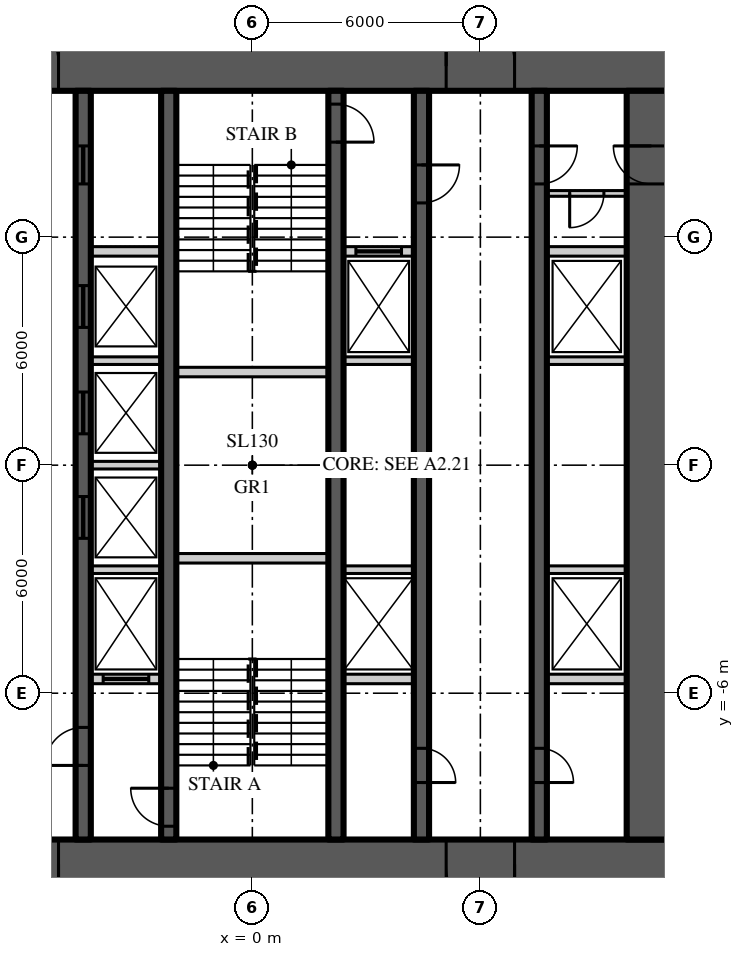
"""IFC4 building model, lengths in metres.
Left out: names, types, materials, properties, quantities, classifications, styles, units other than length and angle.
Written with IfcOpenShell. Run it as: python <this file> out.ifc"""

import sys

from ifc_helpers import new_model, si_unit, direction, frame, frame_2d, origin, place, context, subcontext, project, spatial, rectangle, extrude, element, fill, save


model = new_model("IFC4")
c1 = context("Model", 3, precision=1e-05, world=origin(), true_north=direction((0.0, 1.0)))
c2 = subcontext(c1, "Body", "Model", "MODEL_VIEW")
j1 = project(units=[si_unit("LENGTHUNIT", "METRE"), si_unit("PLANEANGLEUNIT", "RADIAN")], contexts=[c1])
p1 = place(None, origin())
s1 = spatial("IfcSite", under=j1, at=p1, CompositionType="ELEMENT")
p2 = place(p1, origin())
s2 = spatial("IfcBuilding", under=s1, at=p2, CompositionType="ELEMENT")
p3 = place(p2, frame((0.0, 0.0, 147.6)))
s3 = spatial("IfcBuildingStorey", under=s2, at=p3, CompositionType="ELEMENT", Elevation=147.6)
p4 = place(p3, frame((-11.15, 10.5, 0.0), z_axis=(0.0, 0.0, 1.0), x_axis=(1.0, 0.0, 0.0)))
e1 = element("IfcWall", 1, at=p4, inside=s3, PredefinedType="SHEAR", context=c2, shape_type="SweptSolid", body=[
    extrude(rectangle(XDim=22.3, YDim=1.3, at=frame_2d((11.15, 0.0))), origin(), (0.0, 0.0, 1.0), 3.9),
])
p5 = place(p4, frame((4.25, 0.0, 0.0)))
e2 = element("IfcOpeningElement", 2, at=p5, cuts=e1, PredefinedType="OPENING", context=c2, shape_type="SweptSolid", body=[
    extrude(rectangle(XDim=1.8, YDim=2.2, at=frame_2d((0.9, 1.1))), frame((0.0, 0.66, 0.0), z_axis=(0.0, -1.0, 0.0), x_axis=(1.0, 0.0, 0.0)), (0.0, 0.0, 1.0), 1.32),
])
p6 = place(p4, frame((16.25, 0.0, 0.0)))
e3 = element("IfcOpeningElement", 3, at=p6, cuts=e1, PredefinedType="OPENING", context=c2, shape_type="SweptSolid", body=[
    extrude(rectangle(XDim=1.8, YDim=2.2, at=frame_2d((0.9, 1.1))), frame((0.0, 0.66, 0.0), z_axis=(0.0, -1.0, 0.0), x_axis=(1.0, 0.0, 0.0)), (0.0, 0.0, 1.0), 1.32),
])
p7 = place(p3, frame((11.15, -10.5, 0.0), z_axis=(0.0, 0.0, 1.0), x_axis=(-1.0, 0.0, 0.0)))
e4 = element("IfcWall", 4, at=p7, inside=s3, PredefinedType="SHEAR", context=c2, shape_type="SweptSolid", body=[
    extrude(rectangle(XDim=22.3, YDim=1.3, at=frame_2d((11.15, 0.0))), origin(), (0.0, 0.0, 1.0), 3.9),
])
p8 = place(p7, frame((16.25, 0.0, 0.0)))
e5 = element("IfcOpeningElement", 5, at=p8, cuts=e4, PredefinedType="OPENING", context=c2, shape_type="SweptSolid", body=[
    extrude(rectangle(XDim=1.8, YDim=2.2, at=frame_2d((0.9, 1.1))), frame((0.0, 0.66, 0.0), z_axis=(0.0, -1.0, 0.0), x_axis=(1.0, 0.0, 0.0)), (0.0, 0.0, 1.0), 1.32),
])
p9 = place(p7, frame((4.25, 0.0, 0.0)))
e6 = element("IfcOpeningElement", 6, at=p9, cuts=e4, PredefinedType="OPENING", context=c2, shape_type="SweptSolid", body=[
    extrude(rectangle(XDim=1.8, YDim=2.2, at=frame_2d((0.9, 1.1))), frame((0.0, 0.66, 0.0), z_axis=(0.0, -1.0, 0.0), x_axis=(1.0, 0.0, 0.0)), (0.0, 0.0, 1.0), 1.32),
])
p10 = place(p3, frame((10.5, -9.85, 0.0), z_axis=(0.0, 0.0, 1.0), x_axis=(0.0, 1.0, 0.0)))
e7 = element("IfcWall", 7, at=p10, inside=s3, PredefinedType="SHEAR", context=c2, shape_type="SweptSolid", body=[
    extrude(rectangle(XDim=19.7, YDim=1.3, at=frame_2d((9.85, 0.0))), origin(), (0.0, 0.0, 1.0), 3.9),
])
p11 = place(p10, frame((17.25, 0.0, 0.0)))
e8 = element("IfcOpeningElement", 8, at=p11, cuts=e7, PredefinedType="OPENING", context=c2, shape_type="SweptSolid", body=[
    extrude(rectangle(XDim=1.0, YDim=2.2, at=frame_2d((0.5, 1.1))), frame((0.0, 0.66, 0.0), z_axis=(0.0, -1.0, 0.0), x_axis=(1.0, 0.0, 0.0)), (0.0, 0.0, 1.0), 1.32),
])
p12 = place(p3, frame((7.55, 9.85, 0.0), z_axis=(0.0, 0.0, 1.0), x_axis=(0.0, -1.0, 0.0)))
e9 = element("IfcWall", 9, at=p12, inside=s3, PredefinedType="SHEAR", context=c2, shape_type="SweptSolid", body=[
    extrude(rectangle(XDim=19.7, YDim=0.4, at=frame_2d((9.85, 0.0))), origin(), (0.0, 0.0, 1.0), 3.9),
])
p13 = place(p12, frame((1.45, 0.0, 0.0)))
e10 = element("IfcOpeningElement", 10, at=p13, cuts=e9, PredefinedType="OPENING", context=c2, shape_type="SweptSolid", body=[
    extrude(rectangle(XDim=1.0, YDim=2.2, at=frame_2d((0.5, 1.1))), frame((0.0, 0.21, 0.0), z_axis=(0.0, -1.0, 0.0), x_axis=(1.0, 0.0, 0.0)), (0.0, 0.0, 1.0), 0.42),
])
p14 = place(p12, frame((17.3, 0.0, 0.0)))
e11 = element("IfcOpeningElement", 11, at=p14, cuts=e9, PredefinedType="OPENING", context=c2, shape_type="SweptSolid", body=[
    extrude(rectangle(XDim=0.9, YDim=2.1, at=frame_2d((0.45, 1.05))), frame((0.0, 0.21, 0.0), z_axis=(0.0, -1.0, 0.0), x_axis=(1.0, 0.0, 0.0)), (0.0, 0.0, 1.0), 0.42),
])
p15 = place(p3, frame((-4.45, -9.85, 0.0), z_axis=(0.0, 0.0, 1.0), x_axis=(0.0, 1.0, 0.0)))
e12 = element("IfcWall", 12, at=p15, inside=s3, PredefinedType="SHEAR", context=c2, shape_type="SweptSolid", body=[
    extrude(rectangle(XDim=19.7, YDim=0.4, at=frame_2d((9.85, 0.0))), origin(), (0.0, 0.0, 1.0), 3.9),
])
p16 = place(p15, frame((1.95, 0.0, 0.0)))
e13 = element("IfcOpeningElement", 13, at=p16, cuts=e12, PredefinedType="OPENING", context=c2, shape_type="SweptSolid", body=[
    extrude(rectangle(XDim=1.0, YDim=2.2, at=frame_2d((0.5, 1.1))), frame((0.0, 0.21, 0.0), z_axis=(0.0, -1.0, 0.0), x_axis=(1.0, 0.0, 0.0)), (0.0, 0.0, 1.0), 0.42),
])
p17 = place(p15, frame((17.25, 0.0, 0.0)))
e14 = element("IfcOpeningElement", 14, at=p17, cuts=e12, PredefinedType="OPENING", context=c2, shape_type="SweptSolid", body=[
    extrude(rectangle(XDim=1.0, YDim=2.1, at=frame_2d((0.5, 1.05))), frame((0.0, 0.21, 0.0), z_axis=(0.0, -1.0, 0.0), x_axis=(1.0, 0.0, 0.0)), (0.0, 0.0, 1.0), 0.42),
])
p18 = place(p15, frame((7.925, 0.0, 0.0)))
e15 = element("IfcOpeningElement", 15, at=p18, cuts=e12, PredefinedType="OPENING", context=c2, shape_type="SweptSolid", body=[
    extrude(rectangle(XDim=1.1, YDim=2.2, at=frame_2d((0.55, 1.1))), frame((0.0, 0.21, 0.0), z_axis=(0.0, -1.0, 0.0), x_axis=(1.0, 0.0, 0.0)), (0.0, 0.0, 1.0), 0.42),
])
p19 = place(p15, frame((10.675, 0.0, 0.0)))
e16 = element("IfcOpeningElement", 16, at=p19, cuts=e12, PredefinedType="OPENING", context=c2, shape_type="SweptSolid", body=[
    extrude(rectangle(XDim=1.1, YDim=2.2, at=frame_2d((0.55, 1.1))), frame((0.0, 0.21, 0.0), z_axis=(0.0, -1.0, 0.0), x_axis=(1.0, 0.0, 0.0)), (0.0, 0.0, 1.0), 0.42),
])
p20 = place(p15, frame((13.475, 0.0, 0.0)))
e17 = element("IfcOpeningElement", 17, at=p20, cuts=e12, PredefinedType="OPENING", context=c2, shape_type="SweptSolid", body=[
    extrude(rectangle(XDim=1.1, YDim=2.2, at=frame_2d((0.55, 1.1))), frame((0.0, 0.21, 0.0), z_axis=(0.0, -1.0, 0.0), x_axis=(1.0, 0.0, 0.0)), (0.0, 0.0, 1.0), 0.42),
])
p21 = place(p3, frame((4.45, 9.85, 0.0), z_axis=(0.0, 0.0, 1.0), x_axis=(0.0, -1.0, 0.0)))
e18 = element("IfcWall", 18, at=p21, inside=s3, PredefinedType="SHEAR", context=c2, shape_type="SweptSolid", body=[
    extrude(rectangle(XDim=19.7, YDim=0.4, at=frame_2d((9.85, 0.0))), origin(), (0.0, 0.0, 1.0), 3.9),
])
p22 = place(p21, frame((1.95, 0.0, 0.0)))
e19 = element("IfcOpeningElement", 19, at=p22, cuts=e18, PredefinedType="OPENING", context=c2, shape_type="SweptSolid", body=[
    extrude(rectangle(XDim=1.0, YDim=2.2, at=frame_2d((0.5, 1.1))), frame((0.0, 0.21, 0.0), z_axis=(0.0, -1.0, 0.0), x_axis=(1.0, 0.0, 0.0)), (0.0, 0.0, 1.0), 0.42),
])
p23 = place(p21, frame((17.3, 0.0, 0.0)))
e20 = element("IfcOpeningElement", 20, at=p23, cuts=e18, PredefinedType="OPENING", context=c2, shape_type="SweptSolid", body=[
    extrude(rectangle(XDim=0.9, YDim=2.1, at=frame_2d((0.45, 1.05))), frame((0.0, 0.21, 0.0), z_axis=(0.0, -1.0, 0.0), x_axis=(1.0, 0.0, 0.0)), (0.0, 0.0, 1.0), 0.42),
])
p24 = place(p3, frame((-2.2, -9.85, 0.0), z_axis=(0.0, 0.0, 1.0), x_axis=(0.0, 1.0, 0.0)))
e21 = element("IfcWall", 21, at=p24, inside=s3, PredefinedType="SHEAR", context=c2, shape_type="SweptSolid", body=[
    extrude(rectangle(XDim=19.7, YDim=0.4, at=frame_2d((9.85, 0.0))), origin(), (0.0, 0.0, 1.0), 3.9),
])
p25 = place(p24, frame((0.35, 0.0, 0.0)))
e22 = element("IfcOpeningElement", 22, at=p25, cuts=e21, PredefinedType="OPENING", context=c2, shape_type="SweptSolid", body=[
    extrude(rectangle(XDim=1.0, YDim=2.2, at=frame_2d((0.5, 1.1))), frame((0.0, 0.21, 0.0), z_axis=(0.0, -1.0, 0.0), x_axis=(1.0, 0.0, 0.0)), (0.0, 0.0, 1.0), 0.42),
])
p26 = place(p3, frame((2.2, 9.85, 0.0), z_axis=(0.0, 0.0, 1.0), x_axis=(0.0, -1.0, 0.0)))
e23 = element("IfcWall", 23, at=p26, inside=s3, PredefinedType="SHEAR", context=c2, shape_type="SweptSolid", body=[
    extrude(rectangle(XDim=19.7, YDim=0.4, at=frame_2d((9.85, 0.0))), origin(), (0.0, 0.0, 1.0), 3.9),
])
p27 = place(p26, frame((0.35, 0.0, 0.0)))
e24 = element("IfcOpeningElement", 24, at=p27, cuts=e23, PredefinedType="OPENING", context=c2, shape_type="SweptSolid", body=[
    extrude(rectangle(XDim=1.0, YDim=2.2, at=frame_2d((0.5, 1.1))), frame((0.0, 0.21, 0.0), z_axis=(0.0, -1.0, 0.0), x_axis=(1.0, 0.0, 0.0)), (0.0, 0.0, 1.0), 0.42),
])
p28 = place(p3, frame((-4.25, 5.625, 0.0), z_axis=(0.0, 0.0, 1.0), x_axis=(1.0, 0.0, 0.0)))
e25 = element("IfcWall", 25, at=p28, inside=s3, PredefinedType="SOLIDWALL", context=c2, shape_type="SweptSolid", body=[
    extrude(rectangle(XDim=1.85, YDim=0.25, at=frame_2d((0.925, 0.0))), origin(), (0.0, 0.0, 1.0), 3.7),
])
p29 = place(p3, frame((2.4, 5.625, 0.0), z_axis=(0.0, 0.0, 1.0), x_axis=(1.0, 0.0, 0.0)))
e26 = element("IfcWall", 26, at=p29, inside=s3, PredefinedType="SOLIDWALL", context=c2, shape_type="SweptSolid", body=[
    extrude(rectangle(XDim=1.85, YDim=0.25, at=frame_2d((0.925, 0.0))), origin(), (0.0, 0.0, 1.0), 3.7),
])
p30 = place(p29, frame((0.325, 0.0, 0.0)))
e27 = element("IfcOpeningElement", 27, at=p30, cuts=e26, PredefinedType="OPENING", context=c2, shape_type="SweptSolid", body=[
    extrude(rectangle(XDim=1.2, YDim=2.2, at=frame_2d((0.6, 1.1))), frame((0.0, 0.135, 0.0), z_axis=(0.0, -1.0, 0.0), x_axis=(1.0, 0.0, 0.0)), (0.0, 0.0, 1.0), 0.27),
])
p31 = place(p3, frame((7.75, 5.625, 0.0), z_axis=(0.0, 0.0, 1.0), x_axis=(1.0, 0.0, 0.0)))
e28 = element("IfcWall", 28, at=p31, inside=s3, PredefinedType="SOLIDWALL", context=c2, shape_type="SweptSolid", body=[
    extrude(rectangle(XDim=2.1, YDim=0.25, at=frame_2d((1.05, 0.0))), origin(), (0.0, 0.0, 1.0), 3.7),
])
p32 = place(p3, frame((-4.25, -5.625, 0.0), z_axis=(0.0, 0.0, 1.0), x_axis=(1.0, 0.0, 0.0)))
e29 = element("IfcWall", 29, at=p32, inside=s3, PredefinedType="SOLIDWALL", context=c2, shape_type="SweptSolid", body=[
    extrude(rectangle(XDim=1.85, YDim=0.25, at=frame_2d((0.925, 0.0))), origin(), (0.0, 0.0, 1.0), 3.7),
])
p33 = place(p32, frame((0.325, 0.0, 0.0)))
e30 = element("IfcOpeningElement", 30, at=p33, cuts=e29, PredefinedType="OPENING", context=c2, shape_type="SweptSolid", body=[
    extrude(rectangle(XDim=1.2, YDim=2.2, at=frame_2d((0.6, 1.1))), frame((0.0, 0.135, 0.0), z_axis=(0.0, -1.0, 0.0), x_axis=(1.0, 0.0, 0.0)), (0.0, 0.0, 1.0), 0.27),
])
p34 = place(p3, frame((2.4, -5.625, 0.0), z_axis=(0.0, 0.0, 1.0), x_axis=(1.0, 0.0, 0.0)))
e31 = element("IfcWall", 31, at=p34, inside=s3, PredefinedType="SOLIDWALL", context=c2, shape_type="SweptSolid", body=[
    extrude(rectangle(XDim=1.85, YDim=0.25, at=frame_2d((0.925, 0.0))), origin(), (0.0, 0.0, 1.0), 3.7),
])
p35 = place(p3, frame((7.75, -5.625, 0.0), z_axis=(0.0, 0.0, 1.0), x_axis=(1.0, 0.0, 0.0)))
e32 = element("IfcWall", 32, at=p35, inside=s3, PredefinedType="SOLIDWALL", context=c2, shape_type="SweptSolid", body=[
    extrude(rectangle(XDim=2.1, YDim=0.25, at=frame_2d((1.05, 0.0))), origin(), (0.0, 0.0, 1.0), 3.7),
])
for number, where, z_axis, x_axis in (
    (33, (-2.0, -2.45, 0.0), (0.0, 0.0, 1.0), (1.0, 0.0, 0.0)),
    (34, (-2.0, 2.45, 0.0), (0.0, 0.0, 1.0), (1.0, 0.0, 0.0)),
):
    element("IfcWall", number, at=place(p3, frame(where, z_axis=z_axis, x_axis=x_axis)), inside=s3, PredefinedType="SOLIDWALL", context=c2, shape_type="SweptSolid", body=[
        extrude(rectangle(XDim=4.0, YDim=0.25, at=frame_2d((2.0, 0.0))), origin(), (0.0, 0.0, 1.0), 3.7),
    ])
for number, where, z_axis, x_axis in (
    (35, (-4.25, -2.75, 0.0), (0.0, 0.0, 1.0), (1.0, 0.0, 0.0)),
    (36, (2.4, -2.75, 0.0), (0.0, 0.0, 1.0), (1.0, 0.0, 0.0)),
):
    element("IfcWall", number, at=place(p3, frame(where, z_axis=z_axis, x_axis=x_axis)), inside=s3, PredefinedType="SOLIDWALL", context=c2, shape_type="SweptSolid", body=[
        extrude(rectangle(XDim=1.85, YDim=0.2, at=frame_2d((0.925, 0.0))), origin(), (0.0, 0.0, 1.0), 3.7),
    ])
p36 = place(p3, frame((7.75, -2.75, 0.0), z_axis=(0.0, 0.0, 1.0), x_axis=(1.0, 0.0, 0.0)))
e37 = element("IfcWall", 37, at=p36, inside=s3, PredefinedType="SOLIDWALL", context=c2, shape_type="SweptSolid", body=[
    extrude(rectangle(XDim=2.1, YDim=0.2, at=frame_2d((1.05, 0.0))), origin(), (0.0, 0.0, 1.0), 3.7),
])
for number, where, z_axis, x_axis in (
    (38, (-4.25, 0.0, 0.0), (0.0, 0.0, 1.0), (1.0, 0.0, 0.0)),
    (39, (-4.25, 2.75, 0.0), (0.0, 0.0, 1.0), (1.0, 0.0, 0.0)),
    (40, (2.4, 2.75, 0.0), (0.0, 0.0, 1.0), (1.0, 0.0, 0.0)),
):
    element("IfcWall", number, at=place(p3, frame(where, z_axis=z_axis, x_axis=x_axis)), inside=s3, PredefinedType="SOLIDWALL", context=c2, shape_type="SweptSolid", body=[
        extrude(rectangle(XDim=1.85, YDim=0.2, at=frame_2d((0.925, 0.0))), origin(), (0.0, 0.0, 1.0), 3.7),
    ])
p37 = place(p3, frame((7.75, 2.75, 0.0), z_axis=(0.0, 0.0, 1.0), x_axis=(1.0, 0.0, 0.0)))
e41 = element("IfcWall", 41, at=p37, inside=s3, PredefinedType="SOLIDWALL", context=c2, shape_type="SweptSolid", body=[
    extrude(rectangle(XDim=2.1, YDim=0.2, at=frame_2d((1.05, 0.0))), origin(), (0.0, 0.0, 1.0), 3.7),
])
p38 = place(p3, frame((9.85, 7.15, 0.0), z_axis=(0.0, 0.0, 1.0), x_axis=(-1.0, 0.0, 0.0)))
e42 = element("IfcWall", 42, at=p38, inside=s3, PredefinedType="SOLIDWALL", context=c2, shape_type="SweptSolid", body=[
    extrude(rectangle(XDim=2.1, YDim=0.15, at=frame_2d((1.05, 0.0))), origin(), (0.0, 0.0, 1.0), 3.77),
])
p39 = place(p38, frame((0.6, 0.0, 0.0)))
e43 = element("IfcOpeningElement", 43, at=p39, cuts=e42, PredefinedType="OPENING", context=c2, shape_type="SweptSolid", body=[
    extrude(rectangle(XDim=0.9, YDim=2.1, at=frame_2d((0.45, 1.05))), frame((0.0, 0.085, 0.0), z_axis=(0.0, -1.0, 0.0), x_axis=(1.0, 0.0, 0.0)), (0.0, 0.0, 1.0), 0.17),
])
p40 = place(p5, origin())
e44 = element("IfcDoor", 44, at=p40, inside=s3, OperationType="DOUBLE_DOOR_DOUBLE_SWING", PredefinedType="DOOR", context=c2, shape_type="SweptSolid", body=[
    extrude(rectangle(XDim=1.8, YDim=2.2, at=frame_2d((0.9, 1.1))), frame((0.0, 0.025, 0.0), z_axis=(0.0, -1.0, 0.0), x_axis=(1.0, 0.0, 0.0)), (0.0, 0.0, 1.0), 0.05),
])
fill(e2, e44)
p41 = place(p8, origin())
e45 = element("IfcDoor", 45, at=p41, inside=s3, OperationType="DOUBLE_DOOR_DOUBLE_SWING", PredefinedType="DOOR", context=c2, shape_type="SweptSolid", body=[
    extrude(rectangle(XDim=1.8, YDim=2.2, at=frame_2d((0.9, 1.1))), frame((0.0, 0.025, 0.0), z_axis=(0.0, -1.0, 0.0), x_axis=(1.0, 0.0, 0.0)), (0.0, 0.0, 1.0), 0.05),
])
fill(e5, e45)
p42 = place(p6, origin())
e46 = element("IfcDoor", 46, at=p42, inside=s3, OperationType="DOUBLE_DOOR_DOUBLE_SWING", PredefinedType="DOOR", context=c2, shape_type="SweptSolid", body=[
    extrude(rectangle(XDim=1.8, YDim=2.2, at=frame_2d((0.9, 1.1))), frame((0.0, 0.025, 0.0), z_axis=(0.0, -1.0, 0.0), x_axis=(1.0, 0.0, 0.0)), (0.0, 0.0, 1.0), 0.05),
])
fill(e3, e46)
p43 = place(p9, origin())
e47 = element("IfcDoor", 47, at=p43, inside=s3, OperationType="DOUBLE_DOOR_DOUBLE_SWING", PredefinedType="DOOR", context=c2, shape_type="SweptSolid", body=[
    extrude(rectangle(XDim=1.8, YDim=2.2, at=frame_2d((0.9, 1.1))), frame((0.0, 0.025, 0.0), z_axis=(0.0, -1.0, 0.0), x_axis=(1.0, 0.0, 0.0)), (0.0, 0.0, 1.0), 0.05),
])
fill(e6, e47)
p44 = place(p13, origin())
e48 = element("IfcDoor", 48, at=p44, inside=s3, OperationType="SINGLE_SWING_LEFT", PredefinedType="DOOR", context=c2, shape_type="SweptSolid", body=[
    extrude(rectangle(XDim=1.0, YDim=2.2, at=frame_2d((0.5, 1.1))), frame((0.0, 0.025, 0.0), z_axis=(0.0, -1.0, 0.0), x_axis=(1.0, 0.0, 0.0)), (0.0, 0.0, 1.0), 0.05),
])
fill(e10, e48)
p45 = place(p11, origin())
e49 = element("IfcDoor", 49, at=p45, inside=s3, OperationType="SINGLE_SWING_RIGHT", PredefinedType="DOOR", context=c2, shape_type="SweptSolid", body=[
    extrude(rectangle(XDim=1.0, YDim=2.2, at=frame_2d((0.5, 1.1))), frame((0.0, 0.025, 0.0), z_axis=(0.0, -1.0, 0.0), x_axis=(1.0, 0.0, 0.0)), (0.0, 0.0, 1.0), 0.05),
])
fill(e8, e49)
p46 = place(p16, origin())
e50 = element("IfcDoor", 50, at=p46, inside=s3, OperationType="SINGLE_SWING_LEFT", PredefinedType="DOOR", context=c2, shape_type="SweptSolid", body=[
    extrude(rectangle(XDim=1.0, YDim=2.2, at=frame_2d((0.5, 1.1))), frame((0.0, 0.025, 0.0), z_axis=(0.0, -1.0, 0.0), x_axis=(1.0, 0.0, 0.0)), (0.0, 0.0, 1.0), 0.05),
])
fill(e13, e50)
p47 = place(p25, origin())
e51 = element("IfcDoor", 51, at=p47, inside=s3, OperationType="SINGLE_SWING_RIGHT", PredefinedType="DOOR", context=c2, shape_type="SweptSolid", body=[
    extrude(rectangle(XDim=1.0, YDim=2.2, at=frame_2d((0.5, 1.1))), frame((0.0, 0.025, 0.0), z_axis=(0.0, -1.0, 0.0), x_axis=(1.0, 0.0, 0.0)), (0.0, 0.0, 1.0), 0.05),
])
fill(e22, e51)
p48 = place(p22, origin())
e52 = element("IfcDoor", 52, at=p48, inside=s3, OperationType="SINGLE_SWING_LEFT", PredefinedType="DOOR", context=c2, shape_type="SweptSolid", body=[
    extrude(rectangle(XDim=1.0, YDim=2.2, at=frame_2d((0.5, 1.1))), frame((0.0, 0.025, 0.0), z_axis=(0.0, -1.0, 0.0), x_axis=(1.0, 0.0, 0.0)), (0.0, 0.0, 1.0), 0.05),
])
fill(e19, e52)
p49 = place(p27, origin())
e53 = element("IfcDoor", 53, at=p49, inside=s3, OperationType="SINGLE_SWING_RIGHT", PredefinedType="DOOR", context=c2, shape_type="SweptSolid", body=[
    extrude(rectangle(XDim=1.0, YDim=2.2, at=frame_2d((0.5, 1.1))), frame((0.0, 0.025, 0.0), z_axis=(0.0, -1.0, 0.0), x_axis=(1.0, 0.0, 0.0)), (0.0, 0.0, 1.0), 0.05),
])
fill(e24, e53)
p50 = place(p17, origin())
e54 = element("IfcDoor", 54, at=p50, inside=s3, OperationType="SLIDING_TO_LEFT", PredefinedType="DOOR", context=c2, shape_type="SweptSolid", body=[
    extrude(rectangle(XDim=1.0, YDim=2.1, at=frame_2d((0.5, 1.05))), frame((0.0, 0.025, 0.0), z_axis=(0.0, -1.0, 0.0), x_axis=(1.0, 0.0, 0.0)), (0.0, 0.0, 1.0), 0.05),
])
fill(e14, e54)
p51 = place(p14, origin())
e55 = element("IfcDoor", 55, at=p51, inside=s3, OperationType="SINGLE_SWING_RIGHT", PredefinedType="DOOR", context=c2, shape_type="SweptSolid", body=[
    extrude(rectangle(XDim=0.9, YDim=2.1, at=frame_2d((0.45, 1.05))), frame((0.0, 0.025, 0.0), z_axis=(0.0, -1.0, 0.0), x_axis=(1.0, 0.0, 0.0)), (0.0, 0.0, 1.0), 0.05),
])
fill(e11, e55)
p52 = place(p23, origin())
e56 = element("IfcDoor", 56, at=p52, inside=s3, OperationType="SINGLE_SWING_RIGHT", PredefinedType="DOOR", context=c2, shape_type="SweptSolid", body=[
    extrude(rectangle(XDim=0.9, YDim=2.1, at=frame_2d((0.45, 1.05))), frame((0.0, 0.025, 0.0), z_axis=(0.0, -1.0, 0.0), x_axis=(1.0, 0.0, 0.0)), (0.0, 0.0, 1.0), 0.05),
])
fill(e20, e56)
p53 = place(p18, origin())
e57 = element("IfcDoor", 57, at=p53, inside=s3, OperationType="SLIDING_TO_LEFT", PredefinedType="DOOR", context=c2, shape_type="SweptSolid", body=[
    extrude(rectangle(XDim=1.1, YDim=2.2, at=frame_2d((0.55, 1.1))), frame((0.0, 0.025, 0.0), z_axis=(0.0, -1.0, 0.0), x_axis=(1.0, 0.0, 0.0)), (0.0, 0.0, 1.0), 0.05),
])
fill(e15, e57)
p54 = place(p19, origin())
e58 = element("IfcDoor", 58, at=p54, inside=s3, OperationType="SLIDING_TO_LEFT", PredefinedType="DOOR", context=c2, shape_type="SweptSolid", body=[
    extrude(rectangle(XDim=1.1, YDim=2.2, at=frame_2d((0.55, 1.1))), frame((0.0, 0.025, 0.0), z_axis=(0.0, -1.0, 0.0), x_axis=(1.0, 0.0, 0.0)), (0.0, 0.0, 1.0), 0.05),
])
fill(e16, e58)
p55 = place(p20, origin())
e59 = element("IfcDoor", 59, at=p55, inside=s3, OperationType="SLIDING_TO_LEFT", PredefinedType="DOOR", context=c2, shape_type="SweptSolid", body=[
    extrude(rectangle(XDim=1.1, YDim=2.2, at=frame_2d((0.55, 1.1))), frame((0.0, 0.025, 0.0), z_axis=(0.0, -1.0, 0.0), x_axis=(1.0, 0.0, 0.0)), (0.0, 0.0, 1.0), 0.05),
])
fill(e17, e59)
p56 = place(p33, origin())
e60 = element("IfcDoor", 60, at=p56, inside=s3, OperationType="SLIDING_TO_LEFT", PredefinedType="DOOR", context=c2, shape_type="SweptSolid", body=[
    extrude(rectangle(XDim=1.2, YDim=2.2, at=frame_2d((0.6, 1.1))), frame((0.0, 0.025, 0.0), z_axis=(0.0, -1.0, 0.0), x_axis=(1.0, 0.0, 0.0)), (0.0, 0.0, 1.0), 0.05),
])
fill(e30, e60)
p57 = place(p30, origin())
e61 = element("IfcDoor", 61, at=p57, inside=s3, OperationType="SLIDING_TO_LEFT", PredefinedType="DOOR", context=c2, shape_type="SweptSolid", body=[
    extrude(rectangle(XDim=1.2, YDim=2.2, at=frame_2d((0.6, 1.1))), frame((0.0, 0.025, 0.0), z_axis=(0.0, -1.0, 0.0), x_axis=(1.0, 0.0, 0.0)), (0.0, 0.0, 1.0), 0.05),
])
fill(e27, e61)
p58 = place(p39, origin())
e62 = element("IfcDoor", 62, at=p58, inside=s3, OperationType="SINGLE_SWING_RIGHT", PredefinedType="DOOR", context=c2, shape_type="SweptSolid", body=[
    extrude(rectangle(XDim=0.9, YDim=2.1, at=frame_2d((0.45, 1.05))), frame((0.0, 0.025, 0.0), z_axis=(0.0, -1.0, 0.0), x_axis=(1.0, 0.0, 0.0)), (0.0, 0.0, 1.0), 0.05),
])
fill(e43, e62)
save(model, sys.argv[1])
